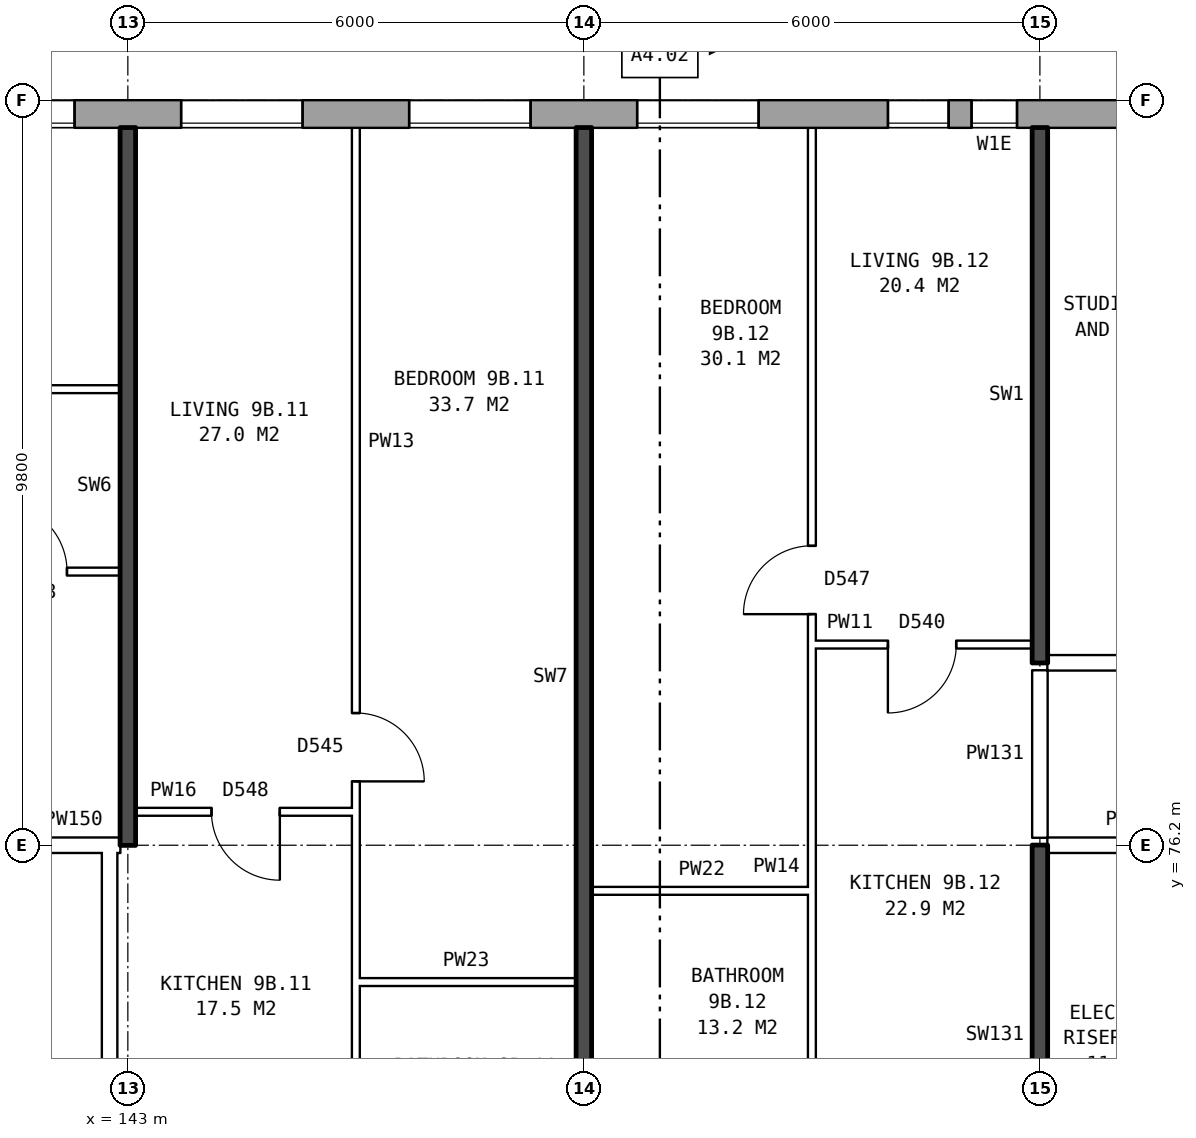
"""IFC4 building model, lengths in metres.
Left out: names, types, materials, properties, quantities, classifications, styles, units other than length and angle.
Written with IfcOpenShell. Run it as: python <this file> out.ifc"""

import sys

from ifc_helpers import new_model, si_unit, direction, frame, frame_2d, origin, place, context, subcontext, project, spatial, rectangle, extrude, element, fill, save


model = new_model("IFC4")
c1 = context("Model", 3, precision=1e-05, world=origin(), true_north=direction((0.0, 1.0)))
c2 = subcontext(c1, "Body", "Model", "MODEL_VIEW")
j1 = project(units=[si_unit("LENGTHUNIT", "METRE"), si_unit("PLANEANGLEUNIT", "RADIAN")], contexts=[c1])
p1 = place(None, origin())
s1 = spatial("IfcSite", under=j1, at=p1, CompositionType="ELEMENT")
p2 = place(p1, origin())
s2 = spatial("IfcBuilding", under=s1, at=p2, CompositionType="ELEMENT")
p3 = place(p2, frame((0.0, 0.0, 35.0)))
s3 = spatial("IfcBuildingStorey", under=s2, at=p3, CompositionType="ELEMENT", Elevation=35.0)
p4 = place(p3, frame((174.675, 85.82, 0.0), z_axis=(0.0, 0.0, 1.0), x_axis=(-1.0, 0.0, 0.0)))
e1 = element("IfcWall", 1, at=p4, inside=s3, PredefinedType="STANDARD", context=c2, shape_type="SweptSolid", body=[
    extrude(rectangle(XDim=40.601, YDim=0.36, at=frame_2d((20.3, 0.0))), origin(), (0.0, 0.0, 1.0), 2.85),
])
p5 = place(p4, frame((2.375, 0.0, 0.8)))
e2 = element("IfcOpeningElement", 2, at=p5, cuts=e1, PredefinedType="OPENING", context=c2, shape_type="SweptSolid", body=[
    extrude(rectangle(XDim=1.6, YDim=1.8, at=frame_2d((0.8, 0.9))), frame((0.0, 0.19, 0.0), z_axis=(0.0, -1.0, 0.0), x_axis=(1.0, 0.0, 0.0)), (0.0, 0.0, 1.0), 0.38),
])
p6 = place(p4, frame((5.375, 0.0, 0.8)))
e3 = element("IfcOpeningElement", 3, at=p6, cuts=e1, PredefinedType="OPENING", context=c2, shape_type="SweptSolid", body=[
    extrude(rectangle(XDim=1.6, YDim=1.8, at=frame_2d((0.8, 0.9))), frame((0.0, 0.19, 0.0), z_axis=(0.0, -1.0, 0.0), x_axis=(1.0, 0.0, 0.0)), (0.0, 0.0, 1.0), 0.38),
])
p7 = place(p4, frame((8.375, 0.0, 0.8)))
e4 = element("IfcOpeningElement", 4, at=p7, cuts=e1, PredefinedType="OPENING", context=c2, shape_type="SweptSolid", body=[
    extrude(rectangle(XDim=1.6, YDim=1.8, at=frame_2d((0.8, 0.9))), frame((0.0, 0.19, 0.0), z_axis=(0.0, -1.0, 0.0), x_axis=(1.0, 0.0, 0.0)), (0.0, 0.0, 1.0), 0.38),
])
p8 = place(p4, frame((11.375, 0.0, 0.8)))
e5 = element("IfcOpeningElement", 5, at=p8, cuts=e1, PredefinedType="OPENING", context=c2, shape_type="SweptSolid", body=[
    extrude(rectangle(XDim=1.6, YDim=1.8, at=frame_2d((0.8, 0.9))), frame((0.0, 0.19, 0.0), z_axis=(0.0, -1.0, 0.0), x_axis=(1.0, 0.0, 0.0)), (0.0, 0.0, 1.0), 0.38),
])
p9 = place(p4, frame((14.375, 0.0, 0.8)))
e6 = element("IfcOpeningElement", 6, at=p9, cuts=e1, PredefinedType="OPENING", context=c2, shape_type="SweptSolid", body=[
    extrude(rectangle(XDim=1.6, YDim=1.8, at=frame_2d((0.8, 0.9))), frame((0.0, 0.19, 0.0), z_axis=(0.0, -1.0, 0.0), x_axis=(1.0, 0.0, 0.0)), (0.0, 0.0, 1.0), 0.38),
])
p10 = place(p4, frame((16.275, 0.0, 0.8)))
e7 = element("IfcOpeningElement", 7, at=p10, cuts=e1, PredefinedType="OPENING", context=c2, shape_type="SweptSolid", body=[
    extrude(rectangle(XDim=1.0, YDim=1.8, at=frame_2d((0.5, 0.9))), frame((0.0, 0.19, 0.0), z_axis=(0.0, -1.0, 0.0), x_axis=(1.0, 0.0, 0.0)), (0.0, 0.0, 1.0), 0.38),
])
p11 = place(p4, frame((19.975, 0.0, 0.15)))
e8 = element("IfcOpeningElement", 8, at=p11, cuts=e1, PredefinedType="OPENING", context=c2, shape_type="SweptSolid", body=[
    extrude(rectangle(XDim=0.6, YDim=1.8, at=frame_2d((0.3, 0.9))), frame((0.0, 0.19, 0.0), z_axis=(0.0, -1.0, 0.0), x_axis=(1.0, 0.0, 0.0)), (0.0, 0.0, 1.0), 0.38),
])
p12 = place(p4, frame((23.375, 0.0, 0.8)))
e9 = element("IfcOpeningElement", 9, at=p12, cuts=e1, PredefinedType="OPENING", context=c2, shape_type="SweptSolid", body=[
    extrude(rectangle(XDim=1.6, YDim=1.8, at=frame_2d((0.8, 0.9))), frame((0.0, 0.19, 0.0), z_axis=(0.0, -1.0, 0.0), x_axis=(1.0, 0.0, 0.0)), (0.0, 0.0, 1.0), 0.38),
])
p13 = place(p4, frame((26.375, 0.0, 0.8)))
e10 = element("IfcOpeningElement", 10, at=p13, cuts=e1, PredefinedType="OPENING", context=c2, shape_type="SweptSolid", body=[
    extrude(rectangle(XDim=1.6, YDim=1.8, at=frame_2d((0.8, 0.9))), frame((0.0, 0.19, 0.0), z_axis=(0.0, -1.0, 0.0), x_axis=(1.0, 0.0, 0.0)), (0.0, 0.0, 1.0), 0.38),
])
p14 = place(p4, frame((29.375, 0.0, 0.8)))
e11 = element("IfcOpeningElement", 11, at=p14, cuts=e1, PredefinedType="OPENING", context=c2, shape_type="SweptSolid", body=[
    extrude(rectangle(XDim=1.6, YDim=1.8, at=frame_2d((0.8, 0.9))), frame((0.0, 0.19, 0.0), z_axis=(0.0, -1.0, 0.0), x_axis=(1.0, 0.0, 0.0)), (0.0, 0.0, 1.0), 0.38),
])
p15 = place(p4, frame((32.375, 0.0, 0.8)))
e12 = element("IfcOpeningElement", 12, at=p15, cuts=e1, PredefinedType="OPENING", context=c2, shape_type="SweptSolid", body=[
    extrude(rectangle(XDim=1.6, YDim=1.8, at=frame_2d((0.8, 0.9))), frame((0.0, 0.19, 0.0), z_axis=(0.0, -1.0, 0.0), x_axis=(1.0, 0.0, 0.0)), (0.0, 0.0, 1.0), 0.38),
])
p16 = place(p4, frame((35.375, 0.0, 0.8)))
e13 = element("IfcOpeningElement", 13, at=p16, cuts=e1, PredefinedType="OPENING", context=c2, shape_type="SweptSolid", body=[
    extrude(rectangle(XDim=1.6, YDim=1.8, at=frame_2d((0.8, 0.9))), frame((0.0, 0.19, 0.0), z_axis=(0.0, -1.0, 0.0), x_axis=(1.0, 0.0, 0.0)), (0.0, 0.0, 1.0), 0.38),
])
p17 = place(p4, frame((38.375, 0.0, 0.8)))
e14 = element("IfcOpeningElement", 14, at=p17, cuts=e1, PredefinedType="OPENING", context=c2, shape_type="SweptSolid", body=[
    extrude(rectangle(XDim=1.6, YDim=1.8, at=frame_2d((0.8, 0.9))), frame((0.0, 0.19, 0.0), z_axis=(0.0, -1.0, 0.0), x_axis=(1.0, 0.0, 0.0)), (0.0, 0.0, 1.0), 0.38),
])
p18 = place(p4, frame((17.575, 0.0, 1.7)))
e15 = element("IfcOpeningElement", 15, at=p18, cuts=e1, PredefinedType="OPENING", context=c2, shape_type="SweptSolid", body=[
    extrude(rectangle(XDim=0.8, YDim=0.9, at=frame_2d((0.4, 0.45))), frame((0.0, 0.19, 0.0), z_axis=(0.0, -1.0, 0.0), x_axis=(1.0, 0.0, 0.0)), (0.0, 0.0, 1.0), 0.38),
])
p19 = place(p4, frame((20.875, 0.0, 0.15)))
e16 = element("IfcOpeningElement", 16, at=p19, cuts=e1, PredefinedType="OPENING", context=c2, shape_type="SweptSolid", body=[
    extrude(rectangle(XDim=0.8, YDim=0.9, at=frame_2d((0.4, 0.45))), frame((0.0, 0.19, 0.0), z_axis=(0.0, -1.0, 0.0), x_axis=(1.0, 0.0, 0.0)), (0.0, 0.0, 1.0), 0.38),
])
p20 = place(p3, frame((142.76, 63.9, 0.0), z_axis=(0.0, 0.0, 1.0), x_axis=(0.0, 1.0, 0.0)))
e17 = element("IfcWall", 17, at=p20, inside=s3, PredefinedType="PARTITIONING", context=c2, shape_type="SweptSolid", body=[
    extrude(rectangle(XDim=12.2, YDim=0.2, at=frame_2d((6.1, 0.0))), origin(), (0.0, 0.0, 1.0), 2.85),
])
p21 = place(p20, frame((5.1, 0.0, 0.0)))
e18 = element("IfcOpeningElement", 18, at=p21, cuts=e17, PredefinedType="OPENING", context=c2, shape_type="SweptSolid", body=[
    extrude(rectangle(XDim=2.0, YDim=2.1, at=frame_2d((1.0, 1.05))), frame((0.0, 0.11, 0.0), z_axis=(0.0, -1.0, 0.0), x_axis=(1.0, 0.0, 0.0)), (0.0, 0.0, 1.0), 0.22),
])
for number, where, z_axis, x_axis in (
    (19, (146.0, 74.4, 0.0), (0.0, 0.0, 1.0), (1.0, 0.0, 0.0)),
    (20, (149.1, 75.6, 0.0), (0.0, 0.0, 1.0), (1.0, 0.0, 0.0)),
):
    element("IfcWall", number, at=place(p3, frame(where, z_axis=z_axis, x_axis=x_axis)), inside=s3, PredefinedType="PARTITIONING", context=c2, shape_type="SweptSolid", body=[
        extrude(rectangle(XDim=2.9, YDim=0.1, at=frame_2d((1.45, 0.0))), origin(), (0.0, 0.0, 1.0), 2.85),
    ])
p22 = place(p3, frame((139.76, 76.2, 0.0), z_axis=(0.0, 0.0, 1.0), x_axis=(1.0, 0.0, 0.0)))
e21 = element("IfcWall", 21, at=p22, inside=s3, PredefinedType="PARTITIONING", context=c2, shape_type="SweptSolid", body=[
    extrude(rectangle(XDim=3.0, YDim=0.2, at=frame_2d((1.5, 0.0))), origin(), (0.0, 0.0, 1.0), 2.85),
])
p23 = place(p22, frame((1.0, 0.0, 0.0)))
e22 = element("IfcOpeningElement", 22, at=p23, cuts=e21, PredefinedType="OPENING", context=c2, shape_type="SweptSolid", body=[
    extrude(rectangle(XDim=1.0, YDim=2.1, at=frame_2d((0.5, 1.05))), frame((0.0, 0.11, 0.0), z_axis=(0.0, -1.0, 0.0), x_axis=(1.0, 0.0, 0.0)), (0.0, 0.0, 1.0), 0.22),
])
p24 = place(p3, frame((142.76, 76.2, 0.0), z_axis=(0.0, 0.0, 1.0), x_axis=(1.0, 0.0, 0.0)))
e23 = element("IfcWall", 23, at=p24, inside=s3, PredefinedType="PARTITIONING", context=c2, shape_type="SweptSolid", body=[
    extrude(rectangle(XDim=0.14, YDim=0.2, at=frame_2d((0.07, 0.0))), origin(), (0.0, 0.0, 1.0), 2.85),
])
p25 = place(p3, frame((155.1, 76.2, 0.0), z_axis=(0.0, 0.0, 1.0), x_axis=(1.0, 0.0, 0.0)))
e24 = element("IfcWall", 24, at=p25, inside=s3, PredefinedType="PARTITIONING", context=c2, shape_type="SweptSolid", body=[
    extrude(rectangle(XDim=2.14, YDim=0.2, at=frame_2d((1.07, 0.0))), origin(), (0.0, 0.0, 1.0), 2.85),
])
p26 = place(p3, frame((143.1, 76.64, 0.0), z_axis=(0.0, 0.0, 1.0), x_axis=(1.0, 0.0, 0.0)))
e25 = element("IfcWall", 25, at=p26, inside=s3, PredefinedType="PARTITIONING", context=c2, shape_type="SweptSolid", body=[
    extrude(rectangle(XDim=2.9, YDim=0.1, at=frame_2d((1.45, 0.0))), origin(), (0.0, 0.0, 1.0), 2.85),
])
p27 = place(p26, frame((1.0, 0.0, 0.0)))
e26 = element("IfcOpeningElement", 26, at=p27, cuts=e25, PredefinedType="OPENING", context=c2, shape_type="SweptSolid", body=[
    extrude(rectangle(XDim=0.9, YDim=2.1, at=frame_2d((0.45, 1.05))), frame((0.0, 0.06, 0.0), z_axis=(0.0, -1.0, 0.0), x_axis=(1.0, 0.0, 0.0)), (0.0, 0.0, 1.0), 0.12),
])
p28 = place(p3, frame((155.1, 78.6, 0.0), z_axis=(0.0, 0.0, 1.0), x_axis=(1.0, 0.0, 0.0)))
e27 = element("IfcWall", 27, at=p28, inside=s3, PredefinedType="PARTITIONING", context=c2, shape_type="SweptSolid", body=[
    extrude(rectangle(XDim=22.29, YDim=0.2, at=frame_2d((11.145, 0.0))), origin(), (0.0, 0.0, 1.0), 2.85),
])
p29 = place(p28, frame((1.45, 0.0, 0.0)))
e28 = element("IfcOpeningElement", 28, at=p29, cuts=e27, PredefinedType="OPENING", context=c2, shape_type="SweptSolid", body=[
    extrude(rectangle(XDim=1.0, YDim=2.1, at=frame_2d((0.5, 1.05))), frame((0.0, 0.11, 0.0), z_axis=(0.0, -1.0, 0.0), x_axis=(1.0, 0.0, 0.0)), (0.0, 0.0, 1.0), 0.22),
])
p30 = place(p28, frame((7.4, 0.0, 0.0)))
e29 = element("IfcOpeningElement", 29, at=p30, cuts=e27, PredefinedType="OPENING", context=c2, shape_type="SweptSolid", body=[
    extrude(rectangle(XDim=1.0, YDim=2.1, at=frame_2d((0.5, 1.05))), frame((0.0, 0.11, 0.0), z_axis=(0.0, -1.0, 0.0), x_axis=(1.0, 0.0, 0.0)), (0.0, 0.0, 1.0), 0.22),
])
p31 = place(p28, frame((14.4, 0.0, 0.0)))
e30 = element("IfcOpeningElement", 30, at=p31, cuts=e27, PredefinedType="OPENING", context=c2, shape_type="SweptSolid", body=[
    extrude(rectangle(XDim=1.0, YDim=2.1, at=frame_2d((0.5, 1.05))), frame((0.0, 0.11, 0.0), z_axis=(0.0, -1.0, 0.0), x_axis=(1.0, 0.0, 0.0)), (0.0, 0.0, 1.0), 0.22),
])
p32 = place(p3, frame((152.0, 78.84, 0.0), z_axis=(0.0, 0.0, 1.0), x_axis=(1.0, 0.0, 0.0)))
e31 = element("IfcWall", 31, at=p32, inside=s3, PredefinedType="PARTITIONING", context=c2, shape_type="SweptSolid", body=[
    extrude(rectangle(XDim=2.9, YDim=0.1, at=frame_2d((1.45, 0.0))), origin(), (0.0, 0.0, 1.0), 2.85),
])
p33 = place(p32, frame((1.0, 0.0, 0.0)))
e32 = element("IfcOpeningElement", 32, at=p33, cuts=e31, PredefinedType="OPENING", context=c2, shape_type="SweptSolid", body=[
    extrude(rectangle(XDim=0.9, YDim=2.1, at=frame_2d((0.45, 1.05))), frame((0.0, 0.06, 0.0), z_axis=(0.0, -1.0, 0.0), x_axis=(1.0, 0.0, 0.0)), (0.0, 0.0, 1.0), 0.12),
])
p34 = place(p3, frame((137.1, 79.8, 0.0), z_axis=(0.0, 0.0, 1.0), x_axis=(1.0, 0.0, 0.0)))
e33 = element("IfcWall", 33, at=p34, inside=s3, PredefinedType="PARTITIONING", context=c2, shape_type="SweptSolid", body=[
    extrude(rectangle(XDim=5.8, YDim=0.1, at=frame_2d((2.9, 0.0))), origin(), (0.0, 0.0, 1.0), 2.85),
])
p35 = place(p34, frame((1.3, 0.0, 0.0)))
e34 = element("IfcOpeningElement", 34, at=p35, cuts=e33, PredefinedType="OPENING", context=c2, shape_type="SweptSolid", body=[
    extrude(rectangle(XDim=0.9, YDim=2.1, at=frame_2d((0.45, 1.05))), frame((0.0, 0.06, 0.0), z_axis=(0.0, -1.0, 0.0), x_axis=(1.0, 0.0, 0.0)), (0.0, 0.0, 1.0), 0.12),
])
p36 = place(p34, frame((4.2, 0.0, 0.0)))
e35 = element("IfcOpeningElement", 35, at=p36, cuts=e33, PredefinedType="OPENING", context=c2, shape_type="SweptSolid", body=[
    extrude(rectangle(XDim=0.9, YDim=2.1, at=frame_2d((0.45, 1.05))), frame((0.0, 0.06, 0.0), z_axis=(0.0, -1.0, 0.0), x_axis=(1.0, 0.0, 0.0)), (0.0, 0.0, 1.0), 0.12),
])
p37 = place(p3, frame((140.6, 82.2, 0.0), z_axis=(0.0, 0.0, 1.0), x_axis=(1.0, 0.0, 0.0)))
e36 = element("IfcWall", 36, at=p37, inside=s3, PredefinedType="PARTITIONING", context=c2, shape_type="SweptSolid", body=[
    extrude(rectangle(XDim=2.3, YDim=0.1, at=frame_2d((1.15, 0.0))), origin(), (0.0, 0.0, 1.0), 2.85),
])
p38 = place(p3, frame((143.0, 76.2, 0.0), z_axis=(0.0, 0.0, 1.0), x_axis=(0.0, 1.0, 0.0)))
e37 = element("IfcWall", 37, at=p38, inside=s3, PredefinedType="SOLIDWALL", context=c2, shape_type="SweptSolid", body=[
    extrude(rectangle(XDim=9.44, YDim=0.2, at=frame_2d((4.72, 0.0))), origin(), (0.0, 0.0, 1.0), 2.85),
])
p39 = place(p3, frame((146.0, 71.3, 0.0), z_axis=(0.0, 0.0, 1.0), x_axis=(0.0, 1.0, 0.0)))
e38 = element("IfcWall", 38, at=p39, inside=s3, PredefinedType="PARTITIONING", context=c2, shape_type="SweptSolid", body=[
    extrude(rectangle(XDim=14.34, YDim=0.1, at=frame_2d((7.17, 0.0))), origin(), (0.0, 0.0, 1.0), 2.85),
])
p40 = place(p39, frame((5.74, 0.0, 0.0)))
e39 = element("IfcOpeningElement", 39, at=p40, cuts=e38, PredefinedType="OPENING", context=c2, shape_type="SweptSolid", body=[
    extrude(rectangle(XDim=0.9, YDim=2.1, at=frame_2d((0.45, 1.05))), frame((0.0, 0.06, 0.0), z_axis=(0.0, -1.0, 0.0), x_axis=(1.0, 0.0, 0.0)), (0.0, 0.0, 1.0), 0.12),
])
p41 = place(p39, frame((0.4, 0.0, 0.0)))
e40 = element("IfcOpeningElement", 40, at=p41, cuts=e38, PredefinedType="OPENING", context=c2, shape_type="SweptSolid", body=[
    extrude(rectangle(XDim=0.9, YDim=2.1, at=frame_2d((0.45, 1.05))), frame((0.0, 0.06, 0.0), z_axis=(0.0, -1.0, 0.0), x_axis=(1.0, 0.0, 0.0)), (0.0, 0.0, 1.0), 0.12),
])
p42 = place(p3, frame((149.0, 71.2, 0.0), z_axis=(0.0, 0.0, 1.0), x_axis=(0.0, 1.0, 0.0)))
e41 = element("IfcWall", 41, at=p42, inside=s3, PredefinedType="SOLIDWALL", context=c2, shape_type="SweptSolid", body=[
    extrude(rectangle(XDim=14.44, YDim=0.2, at=frame_2d((7.22, 0.0))), origin(), (0.0, 0.0, 1.0), 2.85),
])
p43 = place(p3, frame((152.0, 71.3, 0.0), z_axis=(0.0, 0.0, 1.0), x_axis=(0.0, 1.0, 0.0)))
e42 = element("IfcWall", 42, at=p43, inside=s3, PredefinedType="PARTITIONING", context=c2, shape_type="SweptSolid", body=[
    extrude(rectangle(XDim=14.34, YDim=0.1, at=frame_2d((7.17, 0.0))), origin(), (0.0, 0.0, 1.0), 2.85),
])
p44 = place(p43, frame((7.94, 0.0, 0.0)))
e43 = element("IfcOpeningElement", 43, at=p44, cuts=e42, PredefinedType="OPENING", context=c2, shape_type="SweptSolid", body=[
    extrude(rectangle(XDim=0.9, YDim=2.1, at=frame_2d((0.45, 1.05))), frame((0.0, 0.06, 0.0), z_axis=(0.0, -1.0, 0.0), x_axis=(1.0, 0.0, 0.0)), (0.0, 0.0, 1.0), 0.12),
])
p45 = place(p43, frame((0.4, 0.0, 0.0)))
e44 = element("IfcOpeningElement", 44, at=p45, cuts=e42, PredefinedType="OPENING", context=c2, shape_type="SweptSolid", body=[
    extrude(rectangle(XDim=0.9, YDim=2.1, at=frame_2d((0.45, 1.05))), frame((0.0, 0.06, 0.0), z_axis=(0.0, -1.0, 0.0), x_axis=(1.0, 0.0, 0.0)), (0.0, 0.0, 1.0), 0.12),
])
p46 = place(p3, frame((155.0, 71.2, 0.0), z_axis=(0.0, 0.0, 1.0), x_axis=(0.0, 1.0, 0.0)))
e45 = element("IfcWall", 45, at=p46, inside=s3, PredefinedType="SOLIDWALL", context=c2, shape_type="SweptSolid", body=[
    extrude(rectangle(XDim=5.0, YDim=0.2, at=frame_2d((2.5, 0.0))), origin(), (0.0, 0.0, 1.0), 2.85),
])
p47 = place(p3, frame((155.0, 76.3, 0.0), z_axis=(0.0, 0.0, 1.0), x_axis=(0.0, 1.0, 0.0)))
e46 = element("IfcWall", 46, at=p47, inside=s3, PredefinedType="PARTITIONING", context=c2, shape_type="SweptSolid", body=[
    extrude(rectangle(XDim=2.2, YDim=0.2, at=frame_2d((1.1, 0.0))), origin(), (0.0, 0.0, 1.0), 2.85),
])
p48 = place(p3, frame((155.0, 78.6, 0.0), z_axis=(0.0, 0.0, 1.0), x_axis=(0.0, 1.0, 0.0)))
e47 = element("IfcWall", 47, at=p48, inside=s3, PredefinedType="SOLIDWALL", context=c2, shape_type="SweptSolid", body=[
    extrude(rectangle(XDim=7.04, YDim=0.2, at=frame_2d((3.52, 0.0))), origin(), (0.0, 0.0, 1.0), 2.85),
])
p49 = place(p11, origin())
e48 = element("IfcWindow", 48, at=p49, inside=s3, PartitioningType="SINGLE_PANEL", PredefinedType="WINDOW", context=c2, shape_type="SweptSolid", body=[
    extrude(rectangle(XDim=0.6, YDim=1.8, at=frame_2d((0.3, 0.9))), frame((0.0, 0.15, 0.0), z_axis=(0.0, -1.0, 0.0), x_axis=(1.0, 0.0, 0.0)), (0.0, 0.0, 1.0), 0.06),
])
fill(e8, e48)
p50 = place(p12, origin())
e49 = element("IfcWindow", 49, at=p50, inside=s3, PartitioningType="SINGLE_PANEL", PredefinedType="WINDOW", context=c2, shape_type="SweptSolid", body=[
    extrude(rectangle(XDim=1.6, YDim=1.8, at=frame_2d((0.8, 0.9))), frame((0.0, 0.15, 0.0), z_axis=(0.0, -1.0, 0.0), x_axis=(1.0, 0.0, 0.0)), (0.0, 0.0, 1.0), 0.06),
])
fill(e9, e49)
p51 = place(p13, origin())
e50 = element("IfcWindow", 50, at=p51, inside=s3, PartitioningType="SINGLE_PANEL", PredefinedType="WINDOW", context=c2, shape_type="SweptSolid", body=[
    extrude(rectangle(XDim=1.6, YDim=1.8, at=frame_2d((0.8, 0.9))), frame((0.0, 0.15, 0.0), z_axis=(0.0, -1.0, 0.0), x_axis=(1.0, 0.0, 0.0)), (0.0, 0.0, 1.0), 0.06),
])
fill(e10, e50)
p52 = place(p14, origin())
e51 = element("IfcWindow", 51, at=p52, inside=s3, PartitioningType="SINGLE_PANEL", PredefinedType="WINDOW", context=c2, shape_type="SweptSolid", body=[
    extrude(rectangle(XDim=1.6, YDim=1.8, at=frame_2d((0.8, 0.9))), frame((0.0, 0.15, 0.0), z_axis=(0.0, -1.0, 0.0), x_axis=(1.0, 0.0, 0.0)), (0.0, 0.0, 1.0), 0.06),
])
fill(e11, e51)
p53 = place(p15, origin())
e52 = element("IfcWindow", 52, at=p53, inside=s3, PartitioningType="SINGLE_PANEL", PredefinedType="WINDOW", context=c2, shape_type="SweptSolid", body=[
    extrude(rectangle(XDim=1.6, YDim=1.8, at=frame_2d((0.8, 0.9))), frame((0.0, 0.15, 0.0), z_axis=(0.0, -1.0, 0.0), x_axis=(1.0, 0.0, 0.0)), (0.0, 0.0, 1.0), 0.06),
])
fill(e12, e52)
p54 = place(p36, origin())
e53 = element("IfcDoor", 53, at=p54, inside=s3, OperationType="SINGLE_SWING_LEFT", PredefinedType="DOOR", context=c2, shape_type="SweptSolid", body=[
    extrude(rectangle(XDim=0.9, YDim=2.1, at=frame_2d((0.45, 1.05))), frame((0.0, 0.025, 0.0), z_axis=(0.0, -1.0, 0.0), x_axis=(1.0, 0.0, 0.0)), (0.0, 0.0, 1.0), 0.05),
])
fill(e35, e53)
p55 = place(p40, frame((0.9, 0.0, 0.0), z_axis=(0.0, 0.0, 1.0), x_axis=(-1.0, 0.0, 0.0)))
e54 = element("IfcDoor", 54, at=p55, inside=s3, OperationType="SINGLE_SWING_RIGHT", PredefinedType="DOOR", context=c2, shape_type="SweptSolid", body=[
    extrude(rectangle(XDim=0.9, YDim=2.1, at=frame_2d((0.45, 1.05))), frame((0.0, 0.025, 0.0), z_axis=(0.0, -1.0, 0.0), x_axis=(1.0, 0.0, 0.0)), (0.0, 0.0, 1.0), 0.05),
])
fill(e39, e54)
p56 = place(p27, frame((0.9, 0.0, 0.0), z_axis=(0.0, 0.0, 1.0), x_axis=(-1.0, 0.0, 0.0)))
e55 = element("IfcDoor", 55, at=p56, inside=s3, OperationType="SINGLE_SWING_LEFT", PredefinedType="DOOR", context=c2, shape_type="SweptSolid", body=[
    extrude(rectangle(XDim=0.9, YDim=2.1, at=frame_2d((0.45, 1.05))), frame((0.0, 0.025, 0.0), z_axis=(0.0, -1.0, 0.0), x_axis=(1.0, 0.0, 0.0)), (0.0, 0.0, 1.0), 0.05),
])
fill(e26, e55)
p57 = place(p44, origin())
e56 = element("IfcDoor", 56, at=p57, inside=s3, OperationType="SINGLE_SWING_LEFT", PredefinedType="DOOR", context=c2, shape_type="SweptSolid", body=[
    extrude(rectangle(XDim=0.9, YDim=2.1, at=frame_2d((0.45, 1.05))), frame((0.0, 0.025, 0.0), z_axis=(0.0, -1.0, 0.0), x_axis=(1.0, 0.0, 0.0)), (0.0, 0.0, 1.0), 0.05),
])
fill(e43, e56)
p58 = place(p33, frame((0.9, 0.0, 0.0), z_axis=(0.0, 0.0, 1.0), x_axis=(-1.0, 0.0, 0.0)))
e57 = element("IfcDoor", 57, at=p58, inside=s3, OperationType="SINGLE_SWING_RIGHT", PredefinedType="DOOR", context=c2, shape_type="SweptSolid", body=[
    extrude(rectangle(XDim=0.9, YDim=2.1, at=frame_2d((0.45, 1.05))), frame((0.0, 0.025, 0.0), z_axis=(0.0, -1.0, 0.0), x_axis=(1.0, 0.0, 0.0)), (0.0, 0.0, 1.0), 0.05),
])
fill(e32, e57)
p59 = place(p19, origin())
e58 = element("IfcWindow", 58, at=p59, inside=s3, PartitioningType="SINGLE_PANEL", PredefinedType="WINDOW", context=c2, shape_type="SweptSolid", body=[
    extrude(rectangle(XDim=0.8, YDim=0.9, at=frame_2d((0.4, 0.45))), frame((0.0, 0.15, 0.0), z_axis=(0.0, -1.0, 0.0), x_axis=(1.0, 0.0, 0.0)), (0.0, 0.0, 1.0), 0.06),
])
fill(e16, e58)
save(model, sys.argv[1])
